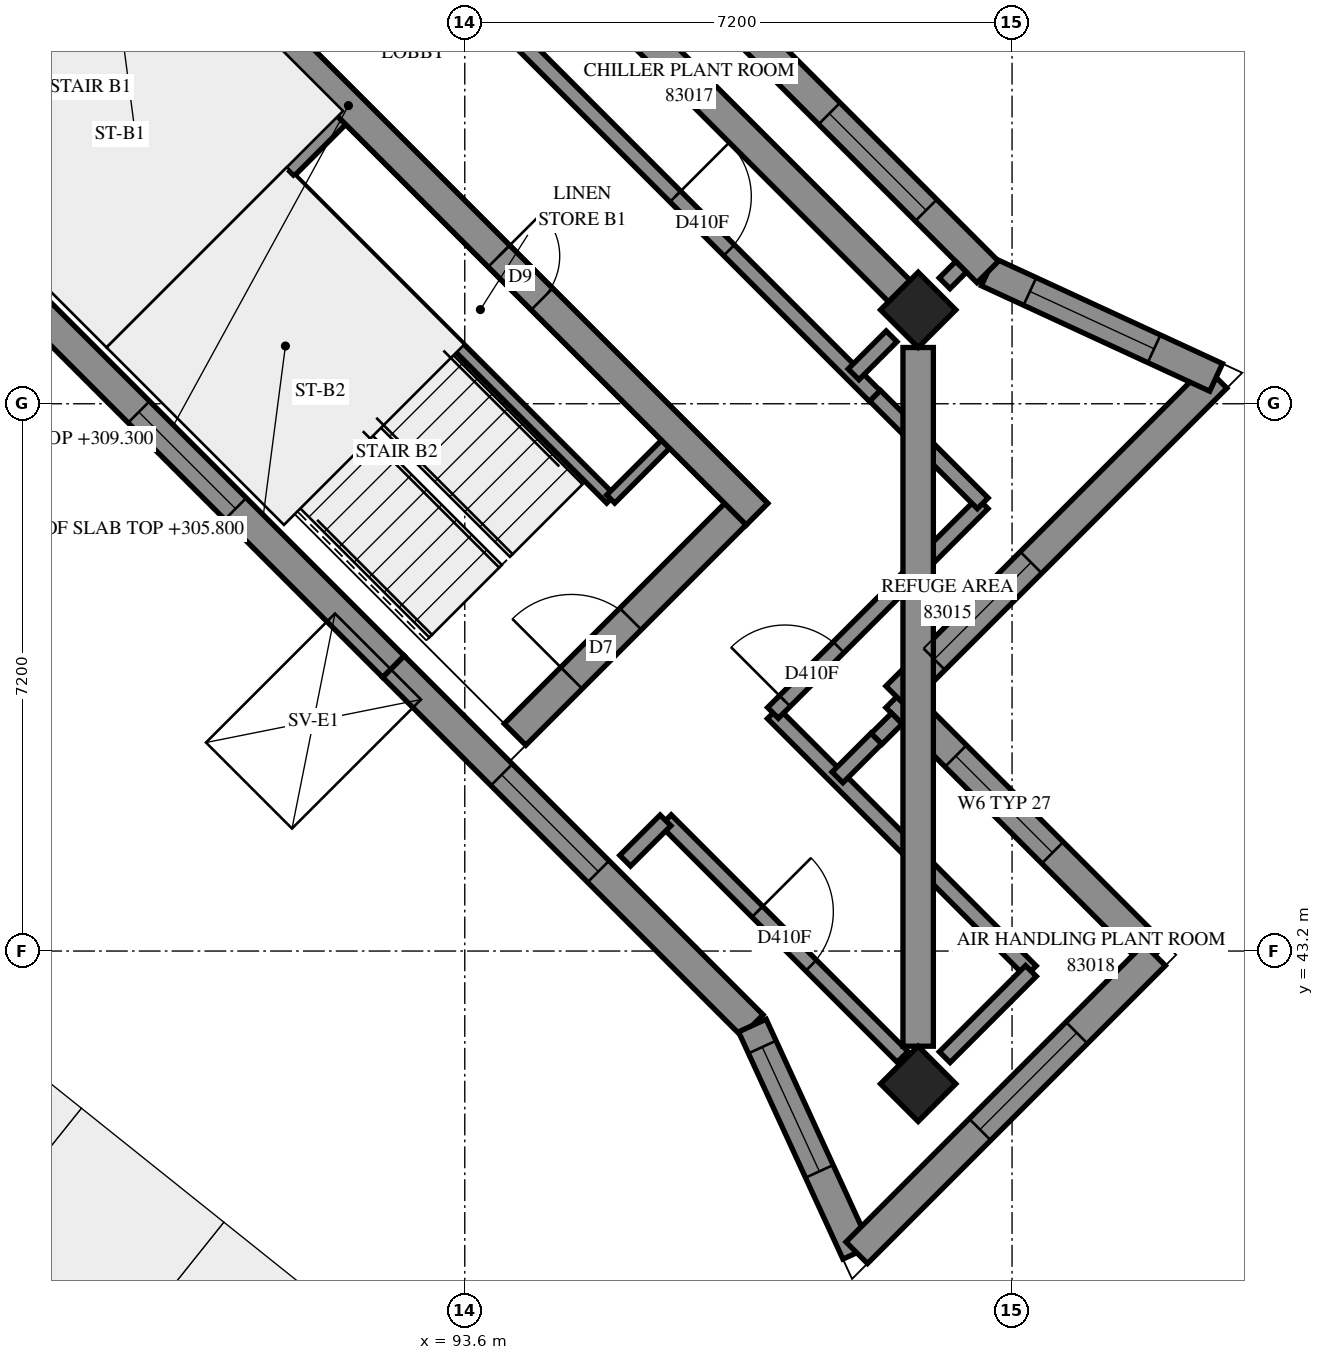
"""IFC4 building model, lengths in metres.
Left out: names, types, materials, properties, quantities, classifications, styles, units other than length and angle.
Written with IfcOpenShell. Run it as: python <this file> out.ifc"""

import sys

from ifc_helpers import new_model, si_unit, direction, frame, frame_2d, origin, origin_2d, place, context, subcontext, project, spatial, polyline, rectangle, outline, extrude, element, fill, save


model = new_model("IFC4")
c1 = context("Model", 3, precision=1e-05, world=origin(), true_north=direction((0.0, 1.0)))
c2 = subcontext(c1, "Body", "Model", "MODEL_VIEW")
j1 = project(units=[si_unit("LENGTHUNIT", "METRE"), si_unit("PLANEANGLEUNIT", "RADIAN")], contexts=[c1])
p1 = place(None, origin())
s1 = spatial("IfcSite", under=j1, at=p1, CompositionType="ELEMENT")
p2 = place(p1, origin())
s2 = spatial("IfcBuilding", under=s1, at=p2, CompositionType="ELEMENT")
p3 = place(p2, frame((0.0, 0.0, 305.8)))
s3 = spatial("IfcBuildingStorey", under=s2, at=p3, CompositionType="ELEMENT", Elevation=305.8)
for number, where, z_axis, x_axis in (
    (1, (99.565, 51.635, 0.0), (0.0, 0.0, 1.0), (0.707, -0.707, 0.0)),
    (2, (99.565, 41.453, 0.0), (0.0, 0.0, 1.0), (0.707, -0.707, 0.0)),
):
    element("IfcColumn", number, at=place(p3, frame(where, z_axis=z_axis, x_axis=x_axis)), inside=s3, PredefinedType="COLUMN", context=c2, shape_type="SweptSolid", body=[
        extrude(rectangle(XDim=0.7, YDim=0.7, at=origin_2d()), origin(), (0.0, 0.0, 1.0), 3.5),
    ])
p4 = place(p3, frame((86.695, 59.696, -0.3), z_axis=(0.0, 0.0, 1.0), x_axis=(0.7071100706, -0.7071034917, 0.0)))
e3 = element("IfcWall", 3, at=p4, inside=s3, PredefinedType="SHEAR", context=c2, shape_type="SweptSolid", body=[
    extrude(outline(polyline([(0.0, 0.0), (15.2, 0.0), (15.2, 3.1), (0.0, 3.1), (0.0, 0.0)])), frame((0.0, 0.2, 0.0), z_axis=(0.0, -1.0, 0.0), x_axis=(1.0, 0.0, 0.0)), (0.0, 0.0, 1.0), 0.4),
])
p5 = place(p4, frame((10.4, 0.0, 0.3)))
e4 = element("IfcOpeningElement", 4, at=p5, cuts=e3, PredefinedType="OPENING", context=c2, shape_type="SweptSolid", body=[
    extrude(rectangle(XDim=0.8, YDim=2.1, at=frame_2d((0.4, 1.05))), frame((0.0, 0.21, 0.0), z_axis=(0.0, -1.0, 0.0), x_axis=(1.0, 0.0, 0.0)), (0.0, 0.0, 1.0), 0.42),
])
p6 = place(p3, frame((94.261, 46.049, -0.3), z_axis=(0.0, 0.0, 1.0), x_axis=(0.7071067812, 0.7071067812, 0.0)))
e5 = element("IfcWall", 5, at=p6, inside=s3, PredefinedType="SHEAR", context=c2, shape_type="SweptSolid", body=[
    extrude(outline(polyline([(0.0, 0.0), (4.1, 0.0), (4.1, 3.1), (0.0, 3.1), (0.0, 0.0)])), frame((0.0, 0.2, 0.0), z_axis=(0.0, -1.0, 0.0), x_axis=(1.0, 0.0, 0.0)), (0.0, 0.0, 1.0), 0.4),
])
p7 = place(p6, frame((1.05, 0.0, 0.3)))
e6 = element("IfcOpeningElement", 6, at=p7, cuts=e5, PredefinedType="OPENING", context=c2, shape_type="SweptSolid", body=[
    extrude(rectangle(XDim=1.1, YDim=2.1, at=frame_2d((0.55, 1.05))), frame((0.0, 0.21, 0.0), z_axis=(0.0, -1.0, 0.0), x_axis=(1.0, 0.0, 0.0)), (0.0, 0.0, 1.0), 0.42),
])
p8 = place(p3, frame((89.029, 51.282, 0.0), z_axis=(0.0, 0.0, 1.0), x_axis=(0.7071067812, 0.7071067812, 0.0)))
e7 = element("IfcWall", 7, at=p8, inside=s3, PredefinedType="SOLIDWALL", context=c2, shape_type="SweptSolid", body=[
    extrude(outline(polyline([(0.0, 0.0), (4.1, 0.0), (4.1, 3.5), (0.0, 3.5), (0.0, 0.0)])), frame((0.0, 0.15, 0.0), z_axis=(0.0, -1.0, 0.0), x_axis=(1.0, 0.0, 0.0)), (0.0, 0.0, 1.0), 0.3),
])
p9 = place(p3, frame((102.676, 43.15, 0.0), z_axis=(0.0, 0.0, 1.0), x_axis=(-0.7070963646, 0.7071171977, 0.0)))
e8 = element("IfcWall", 8, at=p9, inside=s3, PredefinedType="SOLIDWALL", context=c2, shape_type="SweptSolid", body=[
    extrude(outline(polyline([(-0.2, -0.2), (4.6, -0.2), (5.0, 0.2), (0.2, 0.2), (-0.2, -0.2)])), origin(), (0.0, 0.0, 1.0), 3.5),
])
p10 = place(p9, frame((1.9, 0.0, 0.7)))
e9 = element("IfcOpeningElement", 9, at=p10, cuts=e8, PredefinedType="OPENING", context=c2, shape_type="SweptSolid", body=[
    extrude(rectangle(XDim=1.8, YDim=2.2, at=frame_2d((0.9, 1.1))), frame((0.0, 0.21, 0.0), z_axis=(0.0, -1.0, 0.0), x_axis=(1.0, 0.0, 0.0)), (0.0, 0.0, 1.0), 0.42),
])
p11 = place(p3, frame((99.282, 46.544, 0.0), z_axis=(0.0, 0.0, 1.0), x_axis=(0.7071067812, 0.7071067812, 0.0)))
e10 = element("IfcWall", 10, at=p11, inside=s3, PredefinedType="SOLIDWALL", context=c2, shape_type="SweptSolid", body=[
    extrude(outline(polyline([(0.2, -0.2), (6.23, -0.2), (5.657, 0.2), (-0.2, 0.2), (0.2, -0.2)])), origin(), (0.0, 0.0, 1.0), 3.5),
])
p12 = place(p11, frame((0.7, 0.0, 0.7)))
e11 = element("IfcOpeningElement", 11, at=p12, cuts=e10, PredefinedType="OPENING", context=c2, shape_type="SweptSolid", body=[
    extrude(rectangle(XDim=1.8, YDim=2.2, at=frame_2d((0.9, 1.1))), frame((0.0, 0.21, 0.0), z_axis=(0.0, -1.0, 0.0), x_axis=(1.0, 0.0, 0.0)), (0.0, 0.0, 1.0), 0.42),
])
p13 = place(p3, frame((103.484, 50.747, 0.0), z_axis=(0.0, 0.0, 1.0), x_axis=(-0.9078558767, 0.4192823716, 0.0)))
e12 = element("IfcWall", 12, at=p13, inside=s3, PredefinedType="SOLIDWALL", context=c2, shape_type="SweptSolid", body=[
    extrude(outline(polyline([(-0.287, -0.2), (3.273, -0.2), (3.345, 0.2), (0.287, 0.2), (-0.287, -0.2)])), origin(), (0.0, 0.0, 1.0), 3.5),
])
p14 = place(p13, frame((0.898, 0.0, 0.7)))
e13 = element("IfcOpeningElement", 13, at=p14, cuts=e12, PredefinedType="OPENING", context=c2, shape_type="SweptSolid", body=[
    extrude(rectangle(XDim=1.8, YDim=2.2, at=frame_2d((0.9, 1.1))), frame((0.0, 0.21, 0.0), z_axis=(0.0, -1.0, 0.0), x_axis=(1.0, 0.0, 0.0)), (0.0, 0.0, 1.0), 0.42),
])
p15 = place(p3, frame((100.48, 52.134, 0.0), z_axis=(0.0, 0.0, 1.0), x_axis=(-0.7071067812, 0.7071067812, 0.0)))
e14 = element("IfcWall", 14, at=p15, inside=s3, PredefinedType="SOLIDWALL", context=c2, shape_type="SweptSolid", body=[
    extrude(outline(polyline([(0.036, -0.2), (6.718, -0.2), (6.718, 0.2), (-0.036, 0.2), (0.036, -0.2)])), origin(), (0.0, 0.0, 1.0), 3.5),
])
p16 = place(p15, frame((1.147, 0.0, 0.7)))
e15 = element("IfcOpeningElement", 15, at=p16, cuts=e14, PredefinedType="OPENING", context=c2, shape_type="SweptSolid", body=[
    extrude(rectangle(XDim=1.8, YDim=2.2, at=frame_2d((0.9, 1.1))), frame((0.0, 0.21, 0.0), z_axis=(0.0, -1.0, 0.0), x_axis=(1.0, 0.0, 0.0)), (0.0, 0.0, 1.0), 0.42),
])
p17 = place(p15, frame((4.306, 0.0, 0.7)))
e16 = element("IfcOpeningElement", 16, at=p17, cuts=e14, PredefinedType="OPENING", context=c2, shape_type="SweptSolid", body=[
    extrude(rectangle(XDim=1.8, YDim=2.2, at=frame_2d((0.9, 1.1))), frame((0.0, 0.21, 0.0), z_axis=(0.0, -1.0, 0.0), x_axis=(1.0, 0.0, 0.0)), (0.0, 0.0, 1.0), 0.42),
])
p18 = place(p3, frame((87.966, 51.638, 0.0), z_axis=(0.0, 0.0, 1.0), x_axis=(0.7071143097, -0.7070992526, 0.0)))
e17 = element("IfcWall", 17, at=p18, inside=s3, PredefinedType="SOLIDWALL", context=c2, shape_type="SweptSolid", body=[
    extrude(outline(polyline([(0.0, -0.2), (6.641, -0.2), (6.641, 0.2), (0.0, 0.2), (0.0, -0.2)])), origin(), (0.0, 0.0, 1.0), 3.5),
])
p19 = place(p18, frame((1.903, 0.0, 0.7)))
e18 = element("IfcOpeningElement", 18, at=p19, cuts=e17, PredefinedType="OPENING", context=c2, shape_type="SweptSolid", body=[
    extrude(rectangle(XDim=1.8, YDim=2.2, at=frame_2d((0.9, 1.1))), frame((0.0, 0.21, 0.0), z_axis=(0.0, -1.0, 0.0), x_axis=(1.0, 0.0, 0.0)), (0.0, 0.0, 1.0), 0.42),
])
p20 = place(p3, frame((92.662, 46.942, 0.0), z_axis=(0.0, 0.0, 1.0), x_axis=(0.7071067812, -0.7071067812, 0.0)))
e19 = element("IfcWall", 19, at=p20, inside=s3, PredefinedType="SOLIDWALL", context=c2, shape_type="SweptSolid", body=[
    extrude(outline(polyline([(0.0, -0.2), (6.641, -0.2), (6.713, 0.2), (0.0, 0.2), (0.0, -0.2)])), origin(), (0.0, 0.0, 1.0), 3.5),
])
p21 = place(p20, frame((2.012, 0.0, 0.7)))
e20 = element("IfcOpeningElement", 20, at=p21, cuts=e19, PredefinedType="OPENING", context=c2, shape_type="SweptSolid", body=[
    extrude(rectangle(XDim=1.8, YDim=2.2, at=frame_2d((0.9, 1.1))), frame((0.0, 0.21, 0.0), z_axis=(0.0, -1.0, 0.0), x_axis=(1.0, 0.0, 0.0)), (0.0, 0.0, 1.0), 0.42),
])
p22 = place(p3, frame((97.383, 42.22, 0.0), z_axis=(0.0, 0.0, 1.0), x_axis=(0.417459469, -0.908695544, 0.0)))
e21 = element("IfcWall", 21, at=p22, inside=s3, PredefinedType="SOLIDWALL", context=c2, shape_type="SweptSolid", body=[
    extrude(outline(polyline([(0.036, -0.2), (3.577, -0.2), (3.002, 0.2), (-0.036, 0.2), (0.036, -0.2)])), origin(), (0.0, 0.0, 1.0), 3.5),
])
p23 = place(p22, frame((0.312, 0.0, 0.7)))
e22 = element("IfcOpeningElement", 22, at=p23, cuts=e21, PredefinedType="OPENING", context=c2, shape_type="SweptSolid", body=[
    extrude(rectangle(XDim=1.8, YDim=2.2, at=frame_2d((0.9, 1.1))), frame((0.0, 0.21, 0.0), z_axis=(0.0, -1.0, 0.0), x_axis=(1.0, 0.0, 0.0)), (0.0, 0.0, 1.0), 0.42),
])
p24 = place(p3, frame((98.757, 39.231, 0.0), z_axis=(0.0, 0.0, 1.0), x_axis=(0.7071158021, 0.7070977602, 0.0)))
e23 = element("IfcWall", 23, at=p24, inside=s3, PredefinedType="SOLIDWALL", context=c2, shape_type="SweptSolid", body=[
    extrude(outline(polyline([(-0.287, -0.2), (5.743, -0.2), (5.343, 0.2), (0.287, 0.2), (-0.287, -0.2)])), origin(), (0.0, 0.0, 1.0), 3.5),
])
p25 = place(p24, frame((2.293, 0.0, 0.7)))
e24 = element("IfcOpeningElement", 24, at=p25, cuts=e23, PredefinedType="OPENING", context=c2, shape_type="SweptSolid", body=[
    extrude(rectangle(XDim=1.8, YDim=2.2, at=frame_2d((0.9, 1.1))), frame((0.0, 0.21, 0.0), z_axis=(0.0, -1.0, 0.0), x_axis=(1.0, 0.0, 0.0)), (0.0, 0.0, 1.0), 0.42),
])
p26 = place(p3, frame((91.313, 53.354, 0.0), z_axis=(0.0, 0.0, 1.0), x_axis=(0.7071067812, -0.7071067812, 0.0)))
e25 = element("IfcWall", 25, at=p26, inside=s3, PredefinedType="PARTITIONING", context=c2, shape_type="SweptSolid", body=[
    extrude(outline(polyline([(0.0, 0.0), (5.95, 0.0), (5.95, 3.5), (0.0, 3.5), (0.0, 0.0)])), frame((0.0, 0.075, 0.0), z_axis=(0.0, -1.0, 0.0), x_axis=(1.0, 0.0, 0.0)), (0.0, 0.0, 1.0), 0.15),
])
p27 = place(p3, frame((95.52, 49.146, 0.0), z_axis=(0.0, 0.0, 1.0), x_axis=(0.7071067812, 0.7071067812, 0.0)))
e26 = element("IfcWall", 26, at=p27, inside=s3, PredefinedType="PARTITIONING", context=c2, shape_type="SweptSolid", body=[
    extrude(outline(polyline([(0.0, 0.0), (1.02, 0.0), (1.02, 3.5), (0.0, 3.5), (0.0, 0.0)])), frame((0.0, 0.075, 0.0), z_axis=(0.0, -1.0, 0.0), x_axis=(1.0, 0.0, 0.0)), (0.0, 0.0, 1.0), 0.15),
])
p28 = place(p3, frame((91.077, 58.421, 0.0), z_axis=(0.0, 0.0, 1.0), x_axis=(0.7070532037, -0.7071603546, 0.0)))
e27 = element("IfcWall", 27, at=p28, inside=s3, PredefinedType="PARTITIONING", context=c2, shape_type="SweptSolid", body=[
    extrude(rectangle(XDim=11.199, YDim=0.2, at=frame_2d((5.6, 0.0))), origin(), (0.0, 0.0, 1.0), 3.5),
])
p29 = place(p28, frame((0.286, 0.0, 0.0)))
e28 = element("IfcOpeningElement", 28, at=p29, cuts=e27, PredefinedType="OPENING", context=c2, shape_type="SweptSolid", body=[
    extrude(rectangle(XDim=1.0, YDim=2.1, at=frame_2d((0.5, 1.05))), frame((0.0, 0.11, 0.0), z_axis=(0.0, -1.0, 0.0), x_axis=(1.0, 0.0, 0.0)), (0.0, 0.0, 1.0), 0.22),
])
p30 = place(p28, frame((7.486, 0.0, 0.0)))
e29 = element("IfcOpeningElement", 29, at=p30, cuts=e27, PredefinedType="OPENING", context=c2, shape_type="SweptSolid", body=[
    extrude(rectangle(XDim=1.0, YDim=2.1, at=frame_2d((0.5, 1.05))), frame((0.0, 0.11, 0.0), z_axis=(0.0, -1.0, 0.0), x_axis=(1.0, 0.0, 0.0)), (0.0, 0.0, 1.0), 0.22),
])
p31 = place(p3, frame((97.653, 46.328, 0.0), z_axis=(0.0, 0.0, 1.0), x_axis=(0.7071067812, -0.7071067812, 0.0)))
e30 = element("IfcWall", 30, at=p31, inside=s3, PredefinedType="PARTITIONING", context=c2, shape_type="SweptSolid", body=[
    extrude(rectangle(XDim=4.8, YDim=0.2, at=frame_2d((2.4, 0.0))), origin(), (0.0, 0.0, 1.0), 3.5),
])
p32 = place(p3, frame((96.245, 44.921, 0.0), z_axis=(0.0, 0.0, 1.0), x_axis=(0.7071067812, -0.7071067812, 0.0)))
e31 = element("IfcWall", 31, at=p32, inside=s3, PredefinedType="PARTITIONING", context=c2, shape_type="SweptSolid", body=[
    extrude(rectangle(XDim=4.404, YDim=0.2, at=frame_2d((2.202, 0.0))), origin(), (0.0, 0.0, 1.0), 3.5),
])
p33 = place(p32, frame((1.702, 0.0, 0.0)))
e32 = element("IfcOpeningElement", 32, at=p33, cuts=e31, PredefinedType="OPENING", context=c2, shape_type="SweptSolid", body=[
    extrude(rectangle(XDim=1.0, YDim=2.1, at=frame_2d((0.5, 1.05))), frame((0.0, 0.11, 0.0), z_axis=(0.0, -1.0, 0.0), x_axis=(1.0, 0.0, 0.0)), (0.0, 0.0, 1.0), 0.22),
])
p34 = place(p3, frame((97.655, 46.333, 0.0), z_axis=(0.0, 0.0, 1.0), x_axis=(0.7071067812, 0.7071067812, 0.0)))
e33 = element("IfcWall", 33, at=p34, inside=s3, PredefinedType="PARTITIONING", context=c2, shape_type="SweptSolid", body=[
    extrude(rectangle(XDim=3.9, YDim=0.2, at=frame_2d((1.95, 0.0))), origin(), (0.0, 0.0, 1.0), 3.5),
])
p35 = place(p34, frame((0.221, 0.0, 0.0)))
e34 = element("IfcOpeningElement", 34, at=p35, cuts=e33, PredefinedType="OPENING", context=c2, shape_type="SweptSolid", body=[
    extrude(rectangle(XDim=1.0, YDim=2.1, at=frame_2d((0.5, 1.05))), frame((0.0, 0.11, 0.0), z_axis=(0.0, -1.0, 0.0), x_axis=(1.0, 0.0, 0.0)), (0.0, 0.0, 1.0), 0.22),
])
p36 = place(p3, frame((98.998, 50.504, 0.0), z_axis=(0.0, 0.0, 1.0), x_axis=(0.7076063266, -0.7066068826, 0.0)))
e35 = element("IfcWall", 35, at=p36, inside=s3, PredefinedType="PARTITIONING", context=c2, shape_type="SweptSolid", body=[
    extrude(rectangle(XDim=2.001, YDim=0.2, at=frame_2d((1.001, 0.0))), origin(), (0.0, 0.0, 1.0), 3.5),
])
p37 = place(p3, frame((99.914, 41.804, 0.0), z_axis=(0.0, 0.0, 1.0), x_axis=(0.7071067812, 0.7071067812, 0.0)))
e36 = element("IfcWall", 36, at=p37, inside=s3, PredefinedType="PARTITIONING", context=c2, shape_type="SweptSolid", body=[
    extrude(rectangle(XDim=1.604, YDim=0.2, at=frame_2d((0.802, 0.0))), origin(), (0.0, 0.0, 1.0), 3.5),
])
p38 = place(p3, frame((95.71, 44.388, 0.0), z_axis=(0.0, 0.0, 1.0), x_axis=(0.7071067812, 0.7071067812, 0.0)))
e37 = element("IfcWall", 37, at=p38, inside=s3, PredefinedType="PARTITIONING", context=c2, shape_type="SweptSolid", body=[
    extrude(rectangle(XDim=0.751, YDim=0.2, at=frame_2d((0.375, 0.0))), origin(), (0.0, 0.0, 1.0), 3.5),
])
p39 = place(p3, frame((98.503, 45.485, 0.0), z_axis=(0.0, 0.0, 1.0), x_axis=(0.7071067812, 0.7071067812, 0.0)))
e38 = element("IfcWall", 38, at=p39, inside=s3, PredefinedType="PARTITIONING", context=c2, shape_type="SweptSolid", body=[
    extrude(rectangle(XDim=0.724, YDim=0.2, at=frame_2d((0.362, 0.0))), origin(), (0.0, 0.0, 1.0), 3.5),
])
p40 = place(p3, frame((98.715, 50.787, 0.0), z_axis=(0.0, 0.0, 1.0), x_axis=(0.7071067812, 0.7071067812, 0.0)))
e39 = element("IfcWall", 39, at=p40, inside=s3, PredefinedType="PARTITIONING", context=c2, shape_type="SweptSolid", body=[
    extrude(rectangle(XDim=0.707, YDim=0.2, at=frame_2d((0.353, 0.0))), origin(), (0.0, 0.0, 1.0), 3.5),
])
p41 = place(p3, frame((99.019, 45.993, 0.0), z_axis=(0.0, 0.0, 1.0), x_axis=(0.7087023526, 0.7055076012, 0.0)))
e40 = element("IfcWall", 40, at=p41, inside=s3, PredefinedType="PARTITIONING", context=c2, shape_type="SweptSolid", body=[
    extrude(outline(polyline([(0.0, -0.1), (0.376, -0.1), (0.376, 0.1), (0.0, 0.1), (0.0, -0.1)])), origin(), (0.0, 0.0, 1.0), 3.5),
])
p42 = place(p3, frame((99.913, 51.985, 0.0), z_axis=(0.0, 0.0, 1.0), x_axis=(0.7072698781, 0.7069436466, 0.0)))
e41 = element("IfcWall", 41, at=p42, inside=s3, PredefinedType="PARTITIONING", context=c2, shape_type="SweptSolid", body=[
    extrude(outline(polyline([(0.0, -0.1), (0.306, -0.1), (0.306, 0.1), (0.0, 0.1), (0.0, -0.1)])), origin(), (0.0, 0.0, 1.0), 3.5),
])
p43 = place(p10, origin())
e42 = element("IfcWindow", 42, at=p43, inside=s3, PartitioningType="SINGLE_PANEL", PredefinedType="WINDOW", context=c2, shape_type="SweptSolid", body=[
    extrude(rectangle(XDim=1.8, YDim=2.2, at=frame_2d((0.9, 1.1))), frame((0.0, 0.08, 0.0), z_axis=(0.0, -1.0, 0.0), x_axis=(1.0, 0.0, 0.0)), (0.0, 0.0, 1.0), 0.06),
])
fill(e9, e42)
p44 = place(p12, origin())
e43 = element("IfcWindow", 43, at=p44, inside=s3, PartitioningType="SINGLE_PANEL", PredefinedType="WINDOW", context=c2, shape_type="SweptSolid", body=[
    extrude(rectangle(XDim=1.8, YDim=2.2, at=frame_2d((0.9, 1.1))), frame((0.0, 0.08, 0.0), z_axis=(0.0, -1.0, 0.0), x_axis=(1.0, 0.0, 0.0)), (0.0, 0.0, 1.0), 0.06),
])
fill(e11, e43)
p45 = place(p14, origin())
e44 = element("IfcWindow", 44, at=p45, inside=s3, PartitioningType="SINGLE_PANEL", PredefinedType="WINDOW", context=c2, shape_type="SweptSolid", body=[
    extrude(rectangle(XDim=1.8, YDim=2.2, at=frame_2d((0.9, 1.1))), frame((0.0, 0.08, 0.0), z_axis=(0.0, -1.0, 0.0), x_axis=(1.0, 0.0, 0.0)), (0.0, 0.0, 1.0), 0.06),
])
fill(e13, e44)
p46 = place(p16, origin())
e45 = element("IfcWindow", 45, at=p46, inside=s3, PartitioningType="SINGLE_PANEL", PredefinedType="WINDOW", context=c2, shape_type="SweptSolid", body=[
    extrude(rectangle(XDim=1.8, YDim=2.2, at=frame_2d((0.9, 1.1))), frame((0.0, 0.08, 0.0), z_axis=(0.0, -1.0, 0.0), x_axis=(1.0, 0.0, 0.0)), (0.0, 0.0, 1.0), 0.06),
])
fill(e15, e45)
p47 = place(p19, origin())
e46 = element("IfcWindow", 46, at=p47, inside=s3, PartitioningType="SINGLE_PANEL", PredefinedType="WINDOW", context=c2, shape_type="SweptSolid", body=[
    extrude(rectangle(XDim=1.8, YDim=2.2, at=frame_2d((0.9, 1.1))), frame((0.0, 0.08, 0.0), z_axis=(0.0, -1.0, 0.0), x_axis=(1.0, 0.0, 0.0)), (0.0, 0.0, 1.0), 0.06),
])
fill(e18, e46)
p48 = place(p21, origin())
e47 = element("IfcWindow", 47, at=p48, inside=s3, PartitioningType="SINGLE_PANEL", PredefinedType="WINDOW", context=c2, shape_type="SweptSolid", body=[
    extrude(rectangle(XDim=1.8, YDim=2.2, at=frame_2d((0.9, 1.1))), frame((0.0, 0.08, 0.0), z_axis=(0.0, -1.0, 0.0), x_axis=(1.0, 0.0, 0.0)), (0.0, 0.0, 1.0), 0.06),
])
fill(e20, e47)
p49 = place(p23, origin())
e48 = element("IfcWindow", 48, at=p49, inside=s3, PartitioningType="SINGLE_PANEL", PredefinedType="WINDOW", context=c2, shape_type="SweptSolid", body=[
    extrude(rectangle(XDim=1.8, YDim=2.2, at=frame_2d((0.9, 1.1))), frame((0.0, 0.08, 0.0), z_axis=(0.0, -1.0, 0.0), x_axis=(1.0, 0.0, 0.0)), (0.0, 0.0, 1.0), 0.06),
])
fill(e22, e48)
p50 = place(p25, origin())
e49 = element("IfcWindow", 49, at=p50, inside=s3, PartitioningType="SINGLE_PANEL", PredefinedType="WINDOW", context=c2, shape_type="SweptSolid", body=[
    extrude(rectangle(XDim=1.8, YDim=2.2, at=frame_2d((0.9, 1.1))), frame((0.0, 0.08, 0.0), z_axis=(0.0, -1.0, 0.0), x_axis=(1.0, 0.0, 0.0)), (0.0, 0.0, 1.0), 0.06),
])
fill(e24, e49)
p51 = place(p5, origin())
e50 = element("IfcDoor", 50, at=p51, inside=s3, OperationType="SINGLE_SWING_RIGHT", PredefinedType="DOOR", context=c2, shape_type="SweptSolid", body=[
    extrude(rectangle(XDim=0.8, YDim=2.1, at=frame_2d((0.4, 1.05))), frame((0.0, 0.025, 0.0), z_axis=(0.0, -1.0, 0.0), x_axis=(1.0, 0.0, 0.0)), (0.0, 0.0, 1.0), 0.05),
])
fill(e4, e50)
p52 = place(p7, origin())
e51 = element("IfcDoor", 51, at=p52, inside=s3, OperationType="SINGLE_SWING_RIGHT", PredefinedType="DOOR", context=c2, shape_type="SweptSolid", body=[
    extrude(rectangle(XDim=1.1, YDim=2.1, at=frame_2d((0.55, 1.05))), frame((0.0, 0.025, 0.0), z_axis=(0.0, -1.0, 0.0), x_axis=(1.0, 0.0, 0.0)), (0.0, 0.0, 1.0), 0.05),
])
fill(e6, e51)
p53 = place(p35, origin())
e52 = element("IfcDoor", 52, at=p53, inside=s3, OperationType="SINGLE_SWING_LEFT", PredefinedType="DOOR", context=c2, shape_type="SweptSolid", body=[
    extrude(rectangle(XDim=1.0, YDim=2.1, at=frame_2d((0.5, 1.05))), frame((0.0, 0.025, 0.0), z_axis=(0.0, -1.0, 0.0), x_axis=(1.0, 0.0, 0.0)), (0.0, 0.0, 1.0), 0.05),
])
fill(e34, e52)
p54 = place(p30, origin())
e53 = element("IfcDoor", 53, at=p54, inside=s3, OperationType="SINGLE_SWING_LEFT", PredefinedType="DOOR", context=c2, shape_type="SweptSolid", body=[
    extrude(rectangle(XDim=1.0, YDim=2.1, at=frame_2d((0.5, 1.05))), frame((0.0, 0.025, 0.0), z_axis=(0.0, -1.0, 0.0), x_axis=(1.0, 0.0, 0.0)), (0.0, 0.0, 1.0), 0.05),
])
fill(e29, e53)
p55 = place(p33, origin())
e54 = element("IfcDoor", 54, at=p55, inside=s3, OperationType="SINGLE_SWING_RIGHT", PredefinedType="DOOR", context=c2, shape_type="SweptSolid", body=[
    extrude(rectangle(XDim=1.0, YDim=2.1, at=frame_2d((0.5, 1.05))), frame((0.0, 0.025, 0.0), z_axis=(0.0, -1.0, 0.0), x_axis=(1.0, 0.0, 0.0)), (0.0, 0.0, 1.0), 0.05),
])
fill(e32, e54)
save(model, sys.argv[1])
